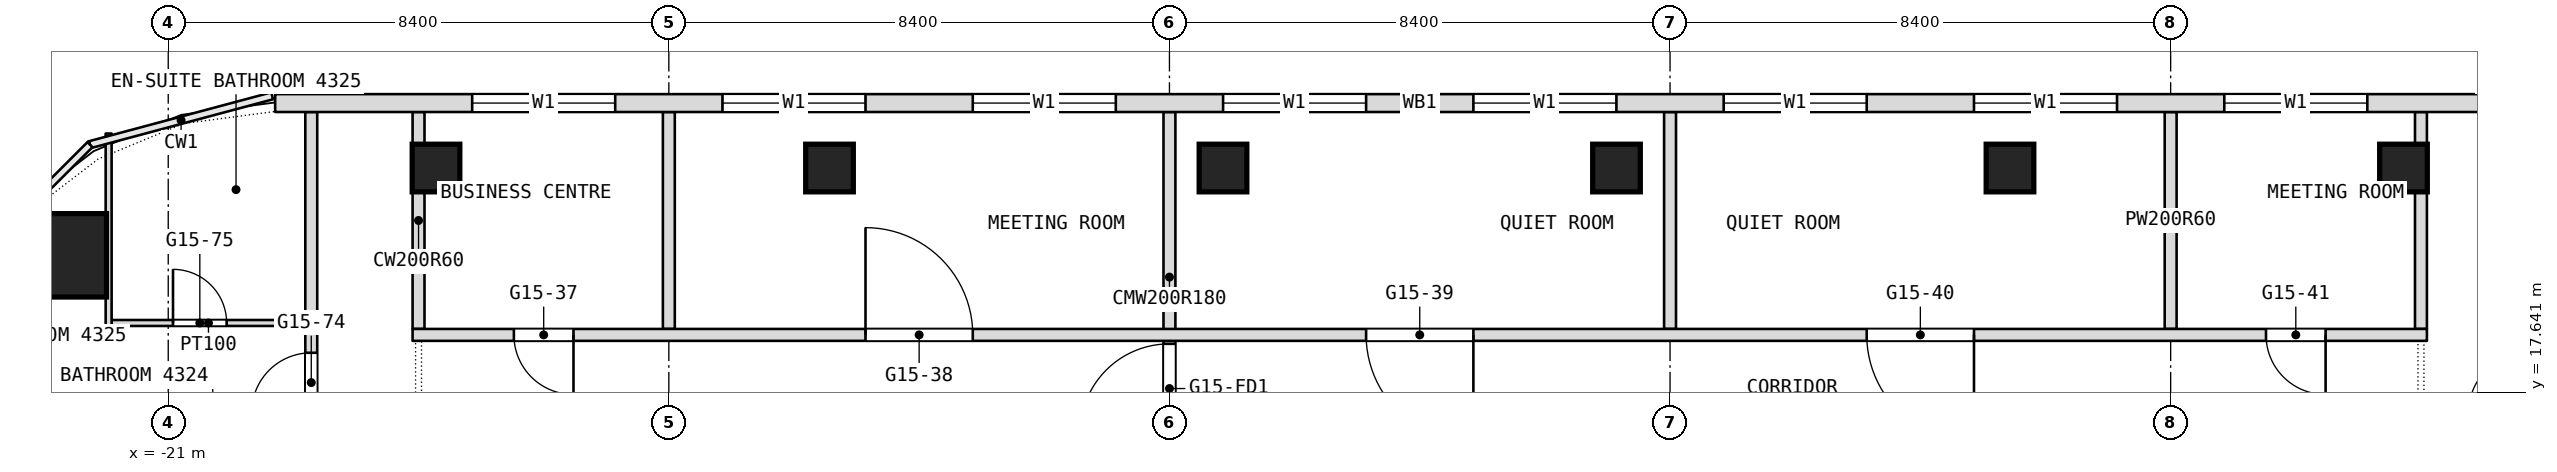
"""IFC4 building model, lengths in metres.
Left out: names, types, materials, properties, quantities, classifications, styles, units other than length and angle.
Written with IfcOpenShell. Run it as: python <this file> out.ifc"""

import sys

from ifc_helpers import new_model, si_unit, direction, frame, frame_2d, origin, origin_2d, place, context, subcontext, project, spatial, rectangle, extrude, element, fill, save


model = new_model("IFC4")
c1 = context("Model", 3, precision=1e-05, world=origin(), true_north=direction((0.0, 1.0)))
c2 = subcontext(c1, "Body", "Model", "MODEL_VIEW")
j1 = project(units=[si_unit("LENGTHUNIT", "METRE"), si_unit("PLANEANGLEUNIT", "RADIAN")], contexts=[c1])
p1 = place(None, origin())
s1 = spatial("IfcSite", under=j1, at=p1, CompositionType="ELEMENT")
p2 = place(p1, origin())
s2 = spatial("IfcBuilding", under=s1, at=p2, CompositionType="ELEMENT")
p3 = place(p2, frame((0.0, 0.0, 191.3)))
s3 = spatial("IfcBuildingStorey", under=s2, at=p3, CompositionType="ELEMENT", Elevation=191.3)
p4 = place(p3, frame((-22.736, 19.936, 0.0), z_axis=(0.0, 0.0, 1.0), x_axis=(1.0, 0.0, 0.0)))
e1 = element("IfcColumn", 1, at=p4, inside=s3, PredefinedType="COLUMN", context=c2, shape_type="SweptSolid", body=[
    extrude(rectangle(XDim=1.4, YDim=1.4, at=origin_2d()), origin(), (0.0, 0.0, 1.0), 3.6),
])
for number, where, z_axis, x_axis in (
    (2, (-16.507, 21.4, 0.0), (0.0, 0.0, 1.0), (1.0, 0.0, 0.0)),
    (3, (-9.904, 21.4, 0.0), (0.0, 0.0, 1.0), (1.0, 0.0, 0.0)),
    (4, (-3.302, 21.4, 0.0), (0.0, 0.0, 1.0), (1.0, 0.0, 0.0)),
    (5, (3.302, 21.4, 0.0), (0.0, 0.0, 1.0), (1.0, 0.0, 0.0)),
    (6, (9.904, 21.4, 0.0), (0.0, 0.0, 1.0), (1.0, 0.0, 0.0)),
    (7, (16.507, 21.4, 0.0), (0.0, 0.0, 1.0), (1.0, 0.0, 0.0)),
):
    element("IfcColumn", number, at=place(p3, frame(where, z_axis=z_axis, x_axis=x_axis)), inside=s3, PredefinedType="COLUMN", context=c2, shape_type="SweptSolid", body=[
        extrude(rectangle(XDim=0.8, YDim=0.8, at=origin_2d()), origin(), (0.0, 0.0, 1.0), 3.6),
    ])
for number, where, z_axis, x_axis in (
    (8, (16.8, 18.7, 0.0), (0.0, 0.0, 1.0), (0.0, 1.0, 0.0)),
    (9, (12.6, 18.7, 0.0), (0.0, 0.0, 1.0), (0.0, 1.0, 0.0)),
    (10, (4.2, 18.7, 0.0), (0.0, 0.0, 1.0), (0.0, 1.0, 0.0)),
):
    element("IfcWall", number, at=place(p3, frame(where, z_axis=z_axis, x_axis=x_axis)), inside=s3, PredefinedType="PARTITIONING", context=c2, shape_type="SweptSolid", body=[
        extrude(rectangle(XDim=3.64, YDim=0.2, at=frame_2d((1.82, 0.0))), origin(), (0.0, 0.0, 1.0), 3.34),
    ])
p5 = place(p3, frame((-4.2, 16.8, 0.0), z_axis=(0.0, 0.0, 1.0), x_axis=(0.0, 1.0, 0.0)))
e11 = element("IfcWall", 11, at=p5, inside=s3, PredefinedType="PARTITIONING", context=c2, shape_type="SweptSolid", body=[
    extrude(rectangle(XDim=5.54, YDim=0.2, at=frame_2d((2.77, 0.0))), origin(), (0.0, 0.0, 1.0), 3.34),
])
p6 = place(p5, frame((0.15, 0.0, 0.0)))
e12 = element("IfcOpeningElement", 12, at=p6, cuts=e11, PredefinedType="OPENING", context=c2, shape_type="SweptSolid", body=[
    extrude(rectangle(XDim=1.5, YDim=2.1, at=frame_2d((0.75, 1.05))), frame((0.0, 0.1, 0.0), z_axis=(0.0, -1.0, 0.0), x_axis=(1.0, 0.0, 0.0)), (0.0, 0.0, 1.0), 0.2),
])
for number, where, z_axis, x_axis in (
    (13, (-12.6, 18.7, 0.0), (0.0, 0.0, 1.0), (0.0, 1.0, 0.0)),
    (14, (-16.8, 18.7, 0.0), (0.0, 0.0, 1.0), (0.0, 1.0, 0.0)),
):
    element("IfcWall", number, at=place(p3, frame(where, z_axis=z_axis, x_axis=x_axis)), inside=s3, PredefinedType="PARTITIONING", context=c2, shape_type="SweptSolid", body=[
        extrude(rectangle(XDim=3.64, YDim=0.2, at=frame_2d((1.82, 0.0))), origin(), (0.0, 0.0, 1.0), 3.34),
    ])
p7 = place(p3, frame((-18.6, -26.751, 0.0), z_axis=(0.0, 0.0, 1.0), x_axis=(0.0, 1.0, 0.0)))
e15 = element("IfcWall", 15, at=p7, inside=s3, PredefinedType="PARTITIONING", context=c2, shape_type="SweptSolid", body=[
    extrude(rectangle(XDim=49.091, YDim=0.2, at=frame_2d((24.545, 0.0))), origin(), (0.0, 0.0, 1.0), 3.34),
])
p8 = place(p7, frame((3.413, 0.0, 0.0)))
e16 = element("IfcOpeningElement", 16, at=p8, cuts=e15, PredefinedType="OPENING", context=c2, shape_type="SweptSolid", body=[
    extrude(rectangle(XDim=1.0, YDim=2.1, at=frame_2d((0.5, 1.05))), frame((0.0, 0.1, 0.0), z_axis=(0.0, -1.0, 0.0), x_axis=(1.0, 0.0, 0.0)), (0.0, 0.0, 1.0), 0.2),
])
p9 = place(p7, frame((5.838, 0.0, 0.0)))
e17 = element("IfcOpeningElement", 17, at=p9, cuts=e15, PredefinedType="OPENING", context=c2, shape_type="SweptSolid", body=[
    extrude(rectangle(XDim=1.0, YDim=2.1, at=frame_2d((0.5, 1.05))), frame((0.0, 0.1, 0.0), z_axis=(0.0, -1.0, 0.0), x_axis=(1.0, 0.0, 0.0)), (0.0, 0.0, 1.0), 0.2),
])
p10 = place(p7, frame((10.351, 0.0, 0.0)))
e18 = element("IfcOpeningElement", 18, at=p10, cuts=e15, PredefinedType="OPENING", context=c2, shape_type="SweptSolid", body=[
    extrude(rectangle(XDim=1.0, YDim=2.1, at=frame_2d((0.5, 1.05))), frame((0.0, 0.1, 0.0), z_axis=(0.0, -1.0, 0.0), x_axis=(1.0, 0.0, 0.0)), (0.0, 0.0, 1.0), 0.2),
])
p11 = place(p7, frame((16.951, 0.0, 0.0)))
e19 = element("IfcOpeningElement", 19, at=p11, cuts=e15, PredefinedType="OPENING", context=c2, shape_type="SweptSolid", body=[
    extrude(rectangle(XDim=1.0, YDim=2.1, at=frame_2d((0.5, 1.05))), frame((0.0, 0.1, 0.0), z_axis=(0.0, -1.0, 0.0), x_axis=(1.0, 0.0, 0.0)), (0.0, 0.0, 1.0), 0.2),
])
p12 = place(p7, frame((21.151, 0.0, 0.0)))
e20 = element("IfcOpeningElement", 20, at=p12, cuts=e15, PredefinedType="OPENING", context=c2, shape_type="SweptSolid", body=[
    extrude(rectangle(XDim=1.0, YDim=2.1, at=frame_2d((0.5, 1.05))), frame((0.0, 0.1, 0.0), z_axis=(0.0, -1.0, 0.0), x_axis=(1.0, 0.0, 0.0)), (0.0, 0.0, 1.0), 0.2),
])
p13 = place(p7, frame((22.951, 0.0, 0.0)))
e21 = element("IfcOpeningElement", 21, at=p13, cuts=e15, PredefinedType="OPENING", context=c2, shape_type="SweptSolid", body=[
    extrude(rectangle(XDim=1.0, YDim=2.1, at=frame_2d((0.5, 1.05))), frame((0.0, 0.1, 0.0), z_axis=(0.0, -1.0, 0.0), x_axis=(1.0, 0.0, 0.0)), (0.0, 0.0, 1.0), 0.2),
])
p14 = place(p7, frame((27.151, 0.0, 0.0)))
e22 = element("IfcOpeningElement", 22, at=p14, cuts=e15, PredefinedType="OPENING", context=c2, shape_type="SweptSolid", body=[
    extrude(rectangle(XDim=1.0, YDim=2.1, at=frame_2d((0.5, 1.05))), frame((0.0, 0.1, 0.0), z_axis=(0.0, -1.0, 0.0), x_axis=(1.0, 0.0, 0.0)), (0.0, 0.0, 1.0), 0.2),
])
p15 = place(p7, frame((33.751, 0.0, 0.0)))
e23 = element("IfcOpeningElement", 23, at=p15, cuts=e15, PredefinedType="OPENING", context=c2, shape_type="SweptSolid", body=[
    extrude(rectangle(XDim=1.0, YDim=2.1, at=frame_2d((0.5, 1.05))), frame((0.0, 0.1, 0.0), z_axis=(0.0, -1.0, 0.0), x_axis=(1.0, 0.0, 0.0)), (0.0, 0.0, 1.0), 0.2),
])
p16 = place(p7, frame((37.951, 0.0, 0.0)))
e24 = element("IfcOpeningElement", 24, at=p16, cuts=e15, PredefinedType="OPENING", context=c2, shape_type="SweptSolid", body=[
    extrude(rectangle(XDim=1.0, YDim=2.1, at=frame_2d((0.5, 1.05))), frame((0.0, 0.1, 0.0), z_axis=(0.0, -1.0, 0.0), x_axis=(1.0, 0.0, 0.0)), (0.0, 0.0, 1.0), 0.2),
])
p17 = place(p7, frame((39.751, 0.0, 0.0)))
e25 = element("IfcOpeningElement", 25, at=p17, cuts=e15, PredefinedType="OPENING", context=c2, shape_type="SweptSolid", body=[
    extrude(rectangle(XDim=1.0, YDim=2.1, at=frame_2d((0.5, 1.05))), frame((0.0, 0.1, 0.0), z_axis=(0.0, -1.0, 0.0), x_axis=(1.0, 0.0, 0.0)), (0.0, 0.0, 1.0), 0.2),
])
p18 = place(p7, frame((44.051, 0.0, 0.0)))
e26 = element("IfcOpeningElement", 26, at=p18, cuts=e15, PredefinedType="OPENING", context=c2, shape_type="SweptSolid", body=[
    extrude(rectangle(XDim=1.0, YDim=2.1, at=frame_2d((0.5, 1.05))), frame((0.0, 0.1, 0.0), z_axis=(0.0, -1.0, 0.0), x_axis=(1.0, 0.0, 0.0)), (0.0, 0.0, 1.0), 0.2),
])
p19 = place(p3, frame((-16.9, 18.6, 0.0), z_axis=(0.0, 0.0, 1.0), x_axis=(1.0, 0.0, 0.0)))
e27 = element("IfcWall", 27, at=p19, inside=s3, PredefinedType="PARTITIONING", context=c2, shape_type="SweptSolid", body=[
    extrude(rectangle(XDim=33.8, YDim=0.2, at=frame_2d((16.9, 0.0))), origin(), (0.0, 0.0, 1.0), 3.34),
])
p20 = place(p19, frame((1.7, 0.0, 0.0)))
e28 = element("IfcOpeningElement", 28, at=p20, cuts=e27, PredefinedType="OPENING", context=c2, shape_type="SweptSolid", body=[
    extrude(rectangle(XDim=1.0, YDim=2.1, at=frame_2d((0.5, 1.05))), frame((0.0, 0.1, 0.0), z_axis=(0.0, -1.0, 0.0), x_axis=(1.0, 0.0, 0.0)), (0.0, 0.0, 1.0), 0.2),
])
p21 = place(p19, frame((7.6, 0.0, 0.0)))
e29 = element("IfcOpeningElement", 29, at=p21, cuts=e27, PredefinedType="OPENING", context=c2, shape_type="SweptSolid", body=[
    extrude(rectangle(XDim=1.8, YDim=2.1, at=frame_2d((0.9, 1.05))), frame((0.0, 0.1, 0.0), z_axis=(0.0, -1.0, 0.0), x_axis=(1.0, 0.0, 0.0)), (0.0, 0.0, 1.0), 0.2),
])
p22 = place(p19, frame((16.0, 0.0, 0.0)))
e30 = element("IfcOpeningElement", 30, at=p22, cuts=e27, PredefinedType="OPENING", context=c2, shape_type="SweptSolid", body=[
    extrude(rectangle(XDim=1.8, YDim=2.1, at=frame_2d((0.9, 1.05))), frame((0.0, 0.1, 0.0), z_axis=(0.0, -1.0, 0.0), x_axis=(1.0, 0.0, 0.0)), (0.0, 0.0, 1.0), 0.2),
])
p23 = place(p19, frame((24.4, 0.0, 0.0)))
e31 = element("IfcOpeningElement", 31, at=p23, cuts=e27, PredefinedType="OPENING", context=c2, shape_type="SweptSolid", body=[
    extrude(rectangle(XDim=1.8, YDim=2.1, at=frame_2d((0.9, 1.05))), frame((0.0, 0.1, 0.0), z_axis=(0.0, -1.0, 0.0), x_axis=(1.0, 0.0, 0.0)), (0.0, 0.0, 1.0), 0.2),
])
p24 = place(p19, frame((31.1, 0.0, 0.0)))
e32 = element("IfcOpeningElement", 32, at=p24, cuts=e27, PredefinedType="OPENING", context=c2, shape_type="SweptSolid", body=[
    extrude(rectangle(XDim=1.0, YDim=2.1, at=frame_2d((0.5, 1.05))), frame((0.0, 0.1, 0.0), z_axis=(0.0, -1.0, 0.0), x_axis=(1.0, 0.0, 0.0)), (0.0, 0.0, 1.0), 0.2),
])
p25 = place(p3, frame((-21.95, 18.8, 0.0), z_axis=(0.0, 0.0, 1.0), x_axis=(1.0, 0.0, 0.0)))
e33 = element("IfcWall", 33, at=p25, inside=s3, PredefinedType="PARTITIONING", context=c2, shape_type="SweptSolid", body=[
    extrude(rectangle(XDim=3.25, YDim=0.1, at=frame_2d((1.625, 0.0))), origin(), (0.0, 0.0, 1.0), 3.34),
])
p26 = place(p25, frame((1.03, 0.0, 0.0)))
e34 = element("IfcOpeningElement", 34, at=p26, cuts=e33, PredefinedType="OPENING", context=c2, shape_type="SweptSolid", body=[
    extrude(rectangle(XDim=0.9, YDim=2.1, at=frame_2d((0.45, 1.05))), frame((0.0, 0.05, 0.0), z_axis=(0.0, -1.0, 0.0), x_axis=(1.0, 0.0, 0.0)), (0.0, 0.0, 1.0), 0.1),
])
p27 = place(p3, frame((-22.0, 18.75, 0.0), z_axis=(0.0, 0.0, 1.0), x_axis=(0.0, 1.0, 0.0)))
e35 = element("IfcWall", 35, at=p27, inside=s3, PredefinedType="PARTITIONING", context=c2, shape_type="SweptSolid", body=[
    extrude(rectangle(XDim=3.229, YDim=0.1, at=frame_2d((1.615, 0.0))), origin(), (0.0, 0.0, 1.0), 3.34),
])
p28 = place(p3, frame((19.206, 22.49, 0.0), z_axis=(0.0, 0.0, 1.0), x_axis=(-1.0, 0.0, 0.0)))
e36 = element("IfcWall", 36, at=p28, inside=s3, PredefinedType="NOTDEFINED", context=c2, shape_type="SweptSolid", body=[
    extrude(rectangle(XDim=38.412, YDim=0.3, at=frame_2d((19.206, 0.0))), origin(), (0.0, 0.0, 1.0), 3.6),
])
p29 = place(p28, frame((3.306, 0.0, 0.9)))
e37 = element("IfcOpeningElement", 37, at=p29, cuts=e36, PredefinedType="OPENING", context=c2, shape_type="SweptSolid", body=[
    extrude(rectangle(XDim=2.4, YDim=2.1, at=frame_2d((1.2, 1.05))), frame((0.0, 0.15, 0.0), z_axis=(0.0, -1.0, 0.0), x_axis=(1.0, 0.0, 0.0)), (0.0, 0.0, 1.0), 0.3),
])
p30 = place(p28, frame((7.506, 0.0, 0.9)))
e38 = element("IfcOpeningElement", 38, at=p30, cuts=e36, PredefinedType="OPENING", context=c2, shape_type="SweptSolid", body=[
    extrude(rectangle(XDim=2.4, YDim=2.1, at=frame_2d((1.2, 1.05))), frame((0.0, 0.15, 0.0), z_axis=(0.0, -1.0, 0.0), x_axis=(1.0, 0.0, 0.0)), (0.0, 0.0, 1.0), 0.3),
])
p31 = place(p28, frame((11.706, 0.0, 0.9)))
e39 = element("IfcOpeningElement", 39, at=p31, cuts=e36, PredefinedType="OPENING", context=c2, shape_type="SweptSolid", body=[
    extrude(rectangle(XDim=2.4, YDim=2.1, at=frame_2d((1.2, 1.05))), frame((0.0, 0.15, 0.0), z_axis=(0.0, -1.0, 0.0), x_axis=(1.0, 0.0, 0.0)), (0.0, 0.0, 1.0), 0.3),
])
p32 = place(p28, frame((15.906, 0.0, 0.9)))
e40 = element("IfcOpeningElement", 40, at=p32, cuts=e36, PredefinedType="OPENING", context=c2, shape_type="SweptSolid", body=[
    extrude(rectangle(XDim=2.4, YDim=2.1, at=frame_2d((1.2, 1.05))), frame((0.0, 0.15, 0.0), z_axis=(0.0, -1.0, 0.0), x_axis=(1.0, 0.0, 0.0)), (0.0, 0.0, 1.0), 0.3),
])
p33 = place(p28, frame((20.106, 0.0, 0.9)))
e41 = element("IfcOpeningElement", 41, at=p33, cuts=e36, PredefinedType="OPENING", context=c2, shape_type="SweptSolid", body=[
    extrude(rectangle(XDim=2.4, YDim=2.1, at=frame_2d((1.2, 1.05))), frame((0.0, 0.15, 0.0), z_axis=(0.0, -1.0, 0.0), x_axis=(1.0, 0.0, 0.0)), (0.0, 0.0, 1.0), 0.3),
])
p34 = place(p28, frame((24.306, 0.0, 0.9)))
e42 = element("IfcOpeningElement", 42, at=p34, cuts=e36, PredefinedType="OPENING", context=c2, shape_type="SweptSolid", body=[
    extrude(rectangle(XDim=2.4, YDim=2.1, at=frame_2d((1.2, 1.05))), frame((0.0, 0.15, 0.0), z_axis=(0.0, -1.0, 0.0), x_axis=(1.0, 0.0, 0.0)), (0.0, 0.0, 1.0), 0.3),
])
p35 = place(p28, frame((28.506, 0.0, 0.9)))
e43 = element("IfcOpeningElement", 43, at=p35, cuts=e36, PredefinedType="OPENING", context=c2, shape_type="SweptSolid", body=[
    extrude(rectangle(XDim=2.4, YDim=2.1, at=frame_2d((1.2, 1.05))), frame((0.0, 0.15, 0.0), z_axis=(0.0, -1.0, 0.0), x_axis=(1.0, 0.0, 0.0)), (0.0, 0.0, 1.0), 0.3),
])
p36 = place(p28, frame((32.706, 0.0, 0.9)))
e44 = element("IfcOpeningElement", 44, at=p36, cuts=e36, PredefinedType="OPENING", context=c2, shape_type="SweptSolid", body=[
    extrude(rectangle(XDim=2.4, YDim=2.1, at=frame_2d((1.2, 1.05))), frame((0.0, 0.15, 0.0), z_axis=(0.0, -1.0, 0.0), x_axis=(1.0, 0.0, 0.0)), (0.0, 0.0, 1.0), 0.3),
])
p37 = place(p18, origin())
e45 = element("IfcDoor", 45, at=p37, inside=s3, OperationType="SINGLE_SWING_LEFT", PredefinedType="DOOR", context=c2, shape_type="SweptSolid", body=[
    extrude(rectangle(XDim=1.0, YDim=2.1, at=frame_2d((0.5, 1.05))), frame((0.0, 0.025, 0.0), z_axis=(0.0, -1.0, 0.0), x_axis=(1.0, 0.0, 0.0)), (0.0, 0.0, 1.0), 0.05),
])
fill(e26, e45)
p38 = place(p20, origin())
e46 = element("IfcDoor", 46, at=p38, inside=s3, OperationType="SINGLE_SWING_LEFT", PredefinedType="DOOR", context=c2, shape_type="SweptSolid", body=[
    extrude(rectangle(XDim=1.0, YDim=2.1, at=frame_2d((0.5, 1.05))), frame((0.0, 0.025, 0.0), z_axis=(0.0, -1.0, 0.0), x_axis=(1.0, 0.0, 0.0)), (0.0, 0.0, 1.0), 0.05),
])
fill(e28, e46)
p39 = place(p21, origin())
e47 = element("IfcDoor", 47, at=p39, inside=s3, OperationType="DOUBLE_DOOR_SINGLE_SWING", PredefinedType="DOOR", context=c2, shape_type="SweptSolid", body=[
    extrude(rectangle(XDim=1.8, YDim=2.1, at=frame_2d((0.9, 1.05))), frame((0.0, 0.025, 0.0), z_axis=(0.0, -1.0, 0.0), x_axis=(1.0, 0.0, 0.0)), (0.0, 0.0, 1.0), 0.05),
])
fill(e29, e47)
p40 = place(p22, origin())
e48 = element("IfcDoor", 48, at=p40, inside=s3, OperationType="DOUBLE_DOOR_SINGLE_SWING", PredefinedType="DOOR", context=c2, shape_type="SweptSolid", body=[
    extrude(rectangle(XDim=1.8, YDim=2.1, at=frame_2d((0.9, 1.05))), frame((0.0, 0.025, 0.0), z_axis=(0.0, -1.0, 0.0), x_axis=(1.0, 0.0, 0.0)), (0.0, 0.0, 1.0), 0.05),
])
fill(e30, e48)
p41 = place(p23, origin())
e49 = element("IfcDoor", 49, at=p41, inside=s3, OperationType="DOUBLE_DOOR_SINGLE_SWING", PredefinedType="DOOR", context=c2, shape_type="SweptSolid", body=[
    extrude(rectangle(XDim=1.8, YDim=2.1, at=frame_2d((0.9, 1.05))), frame((0.0, 0.025, 0.0), z_axis=(0.0, -1.0, 0.0), x_axis=(1.0, 0.0, 0.0)), (0.0, 0.0, 1.0), 0.05),
])
fill(e31, e49)
p42 = place(p24, origin())
e50 = element("IfcDoor", 50, at=p42, inside=s3, OperationType="SINGLE_SWING_LEFT", PredefinedType="DOOR", context=c2, shape_type="SweptSolid", body=[
    extrude(rectangle(XDim=1.0, YDim=2.1, at=frame_2d((0.5, 1.05))), frame((0.0, 0.025, 0.0), z_axis=(0.0, -1.0, 0.0), x_axis=(1.0, 0.0, 0.0)), (0.0, 0.0, 1.0), 0.05),
])
fill(e32, e50)
p43 = place(p26, origin())
e51 = element("IfcDoor", 51, at=p43, inside=s3, OperationType="SINGLE_SWING_LEFT", PredefinedType="DOOR", context=c2, shape_type="SweptSolid", body=[
    extrude(rectangle(XDim=0.9, YDim=2.1, at=frame_2d((0.45, 1.05))), frame((0.0, 0.025, 0.0), z_axis=(0.0, -1.0, 0.0), x_axis=(1.0, 0.0, 0.0)), (0.0, 0.0, 1.0), 0.05),
])
fill(e34, e51)
p44 = place(p29, origin())
e52 = element("IfcWindow", 52, at=p44, inside=s3, PartitioningType="SINGLE_PANEL", PredefinedType="WINDOW", context=c2, shape_type="SweptSolid", body=[
    extrude(rectangle(XDim=2.4, YDim=2.1, at=frame_2d((1.2, 1.05))), frame((0.0, 0.03, 0.0), z_axis=(0.0, -1.0, 0.0), x_axis=(1.0, 0.0, 0.0)), (0.0, 0.0, 1.0), 0.06),
])
fill(e37, e52)
p45 = place(p30, origin())
e53 = element("IfcWindow", 53, at=p45, inside=s3, PartitioningType="SINGLE_PANEL", PredefinedType="WINDOW", context=c2, shape_type="SweptSolid", body=[
    extrude(rectangle(XDim=2.4, YDim=2.1, at=frame_2d((1.2, 1.05))), frame((0.0, 0.03, 0.0), z_axis=(0.0, -1.0, 0.0), x_axis=(1.0, 0.0, 0.0)), (0.0, 0.0, 1.0), 0.06),
])
fill(e38, e53)
p46 = place(p31, origin())
e54 = element("IfcWindow", 54, at=p46, inside=s3, PartitioningType="SINGLE_PANEL", PredefinedType="WINDOW", context=c2, shape_type="SweptSolid", body=[
    extrude(rectangle(XDim=2.4, YDim=2.1, at=frame_2d((1.2, 1.05))), frame((0.0, 0.03, 0.0), z_axis=(0.0, -1.0, 0.0), x_axis=(1.0, 0.0, 0.0)), (0.0, 0.0, 1.0), 0.06),
])
fill(e39, e54)
p47 = place(p32, origin())
e55 = element("IfcWindow", 55, at=p47, inside=s3, PartitioningType="SINGLE_PANEL", PredefinedType="WINDOW", context=c2, shape_type="SweptSolid", body=[
    extrude(rectangle(XDim=2.4, YDim=2.1, at=frame_2d((1.2, 1.05))), frame((0.0, 0.03, 0.0), z_axis=(0.0, -1.0, 0.0), x_axis=(1.0, 0.0, 0.0)), (0.0, 0.0, 1.0), 0.06),
])
fill(e40, e55)
p48 = place(p33, origin())
e56 = element("IfcWindow", 56, at=p48, inside=s3, PartitioningType="SINGLE_PANEL", PredefinedType="WINDOW", context=c2, shape_type="SweptSolid", body=[
    extrude(rectangle(XDim=2.4, YDim=2.1, at=frame_2d((1.2, 1.05))), frame((0.0, 0.03, 0.0), z_axis=(0.0, -1.0, 0.0), x_axis=(1.0, 0.0, 0.0)), (0.0, 0.0, 1.0), 0.06),
])
fill(e41, e56)
p49 = place(p34, origin())
e57 = element("IfcWindow", 57, at=p49, inside=s3, PartitioningType="SINGLE_PANEL", PredefinedType="WINDOW", context=c2, shape_type="SweptSolid", body=[
    extrude(rectangle(XDim=2.4, YDim=2.1, at=frame_2d((1.2, 1.05))), frame((0.0, 0.03, 0.0), z_axis=(0.0, -1.0, 0.0), x_axis=(1.0, 0.0, 0.0)), (0.0, 0.0, 1.0), 0.06),
])
fill(e42, e57)
p50 = place(p35, origin())
e58 = element("IfcWindow", 58, at=p50, inside=s3, PartitioningType="SINGLE_PANEL", PredefinedType="WINDOW", context=c2, shape_type="SweptSolid", body=[
    extrude(rectangle(XDim=2.4, YDim=2.1, at=frame_2d((1.2, 1.05))), frame((0.0, 0.03, 0.0), z_axis=(0.0, -1.0, 0.0), x_axis=(1.0, 0.0, 0.0)), (0.0, 0.0, 1.0), 0.06),
])
fill(e43, e58)
p51 = place(p36, origin())
e59 = element("IfcWindow", 59, at=p51, inside=s3, PartitioningType="SINGLE_PANEL", PredefinedType="WINDOW", context=c2, shape_type="SweptSolid", body=[
    extrude(rectangle(XDim=2.4, YDim=2.1, at=frame_2d((1.2, 1.05))), frame((0.0, 0.03, 0.0), z_axis=(0.0, -1.0, 0.0), x_axis=(1.0, 0.0, 0.0)), (0.0, 0.0, 1.0), 0.06),
])
fill(e44, e59)
p52 = place(p6, origin())
e60 = element("IfcDoor", 60, at=p52, inside=s3, OperationType="DOUBLE_DOOR_DOUBLE_SWING", PredefinedType="DOOR", context=c2, shape_type="SweptSolid", body=[
    extrude(rectangle(XDim=1.5, YDim=2.1, at=frame_2d((0.75, 1.05))), frame((0.0, 0.025, 0.0), z_axis=(0.0, -1.0, 0.0), x_axis=(1.0, 0.0, 0.0)), (0.0, 0.0, 1.0), 0.05),
])
fill(e12, e60)
save(model, sys.argv[1])
